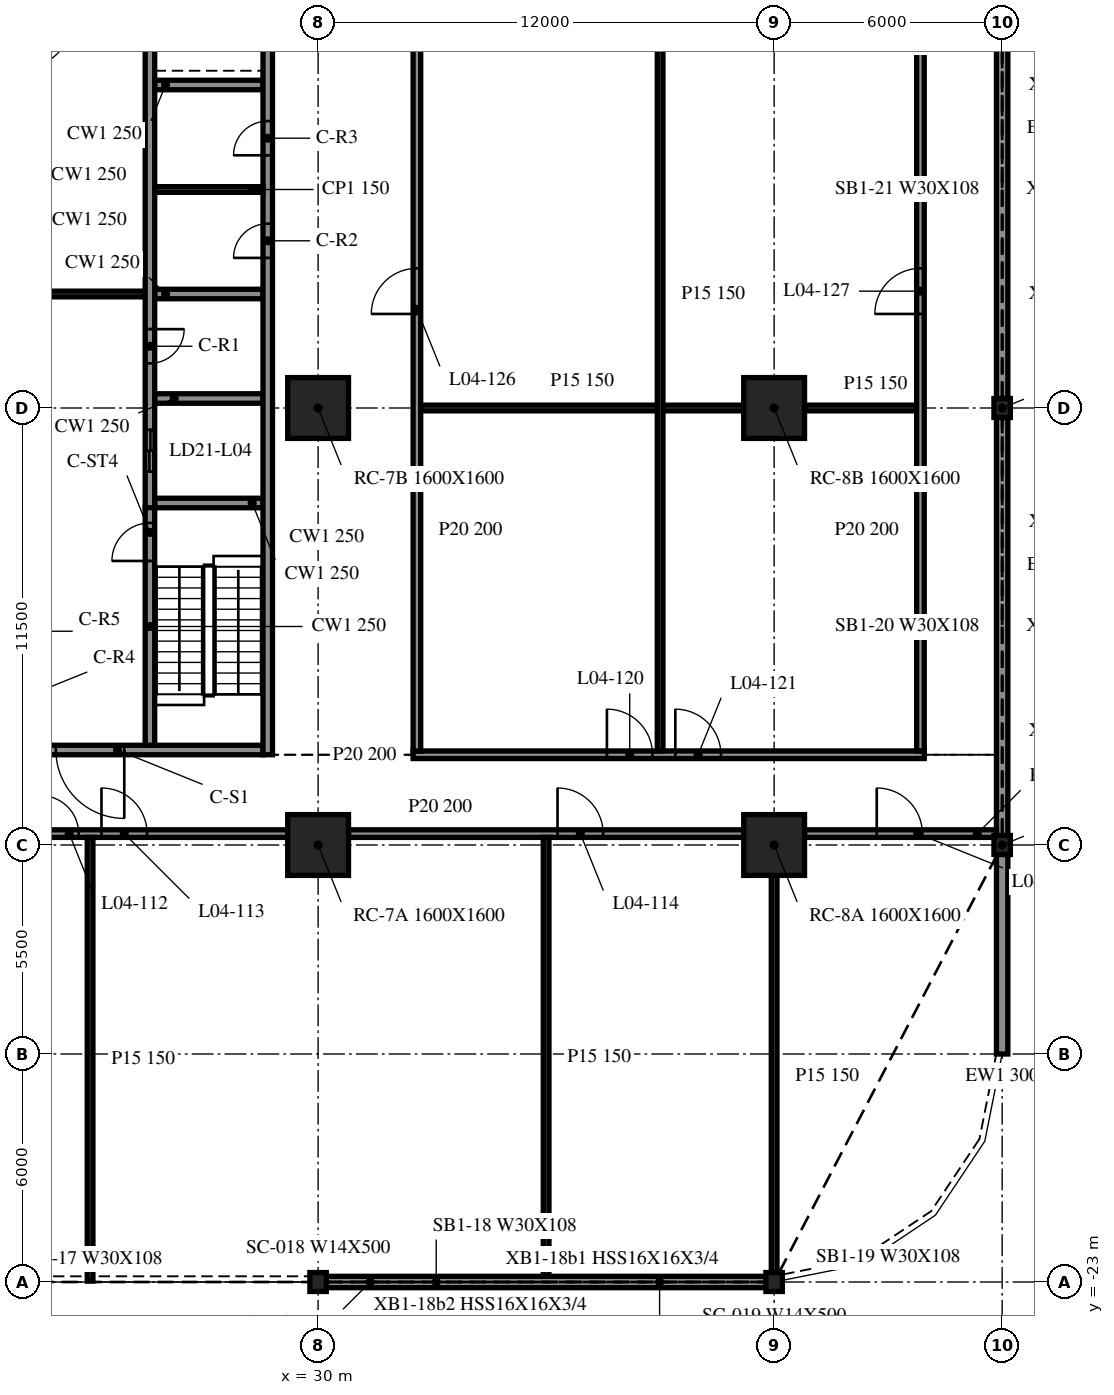
"""IFC4 building model, lengths in metres.
Left out: names, types, materials, properties, quantities, classifications, styles, units other than length and angle.
Written with IfcOpenShell. Run it as: python <this file> out.ifc"""

import sys

from ifc_helpers import new_model, si_unit, direction, frame, frame_2d, origin, origin_2d, place, context, subcontext, project, spatial, rectangle, i_section, extrude, element, fill, save


model = new_model("IFC4")
c1 = context("Model", 3, precision=1e-05, world=origin(), true_north=direction((0.0, 1.0)))
c2 = subcontext(c1, "Body", "Model", "MODEL_VIEW")
j1 = project(units=[si_unit("LENGTHUNIT", "METRE"), si_unit("PLANEANGLEUNIT", "RADIAN")], contexts=[c1])
p1 = place(None, origin())
s1 = spatial("IfcSite", under=j1, at=p1, CompositionType="ELEMENT")
p2 = place(p1, origin())
s2 = spatial("IfcBuilding", under=s1, at=p2, CompositionType="ELEMENT")
p3 = place(p2, frame((0.0, 0.0, 20.1)))
s3 = spatial("IfcBuildingStorey", under=s2, at=p3, CompositionType="ELEMENT", Elevation=20.1)
for number, where, z_axis, x_axis in (
    (1, (30.0, -11.5, -0.34), (0.0, 0.0, 1.0), (1.0, 0.0, 0.0)),
    (2, (30.0, 0.0, -0.34), (0.0, 0.0, 1.0), (1.0, 0.0, 0.0)),
    (3, (42.0, -11.5, -0.34), (0.0, 0.0, 1.0), (1.0, 0.0, 0.0)),
    (4, (42.0, 0.0, -0.34), (0.0, 0.0, 1.0), (1.0, 0.0, 0.0)),
):
    element("IfcColumn", number, at=place(p3, frame(where, z_axis=z_axis, x_axis=x_axis)), inside=s3, PredefinedType="COLUMN", context=c2, shape_type="SweptSolid", body=[
        extrude(rectangle(XDim=1.6, YDim=1.6, at=origin_2d()), origin(), (0.0, 0.0, 1.0), 4.3),
    ])
for number, where, z_axis, x_axis in (
    (5, (30.0, -23.0, -0.34), (0.0, 0.0, 1.0), (1.0, 0.0, 0.0)),
    (6, (42.0, -23.0, -0.34), (0.0, 0.0, 1.0), (1.0, 0.0, 0.0)),
    (7, (48.0, -11.5, -0.34), (0.0, 0.0, 1.0), (1.0, 0.0, 0.0)),
    (8, (48.0, 0.0, -0.34), (0.0, 0.0, 1.0), (1.0, 0.0, 0.0)),
):
    element("IfcColumn", number, at=place(p3, frame(where, z_axis=z_axis, x_axis=x_axis)), inside=s3, PredefinedType="COLUMN", context=c2, shape_type="SweptSolid", body=[
        extrude(i_section(OverallWidth=0.432, OverallDepth=0.498, WebThickness=0.056, FlangeThickness=0.089, at=origin_2d()), origin(), (0.0, 0.0, 1.0), 4.3),
    ])
p4 = place(p3, frame((30.028, -23.0, 0.0), z_axis=(0.0, 0.0, 1.0), x_axis=(1.0, 0.0, 0.0)))
e9 = element("IfcWall", 9, at=p4, inside=s3, PredefinedType="NOTDEFINED", context=c2, shape_type="SweptSolid", body=[
    extrude(rectangle(XDim=11.944, YDim=0.3, at=frame_2d((5.972, 0.0))), origin(), (0.0, 0.0, 1.0), 3.203),
])
p5 = place(p3, frame((48.0, -17.0, 0.0), z_axis=(0.0, 0.0, 1.0), x_axis=(0.0, 1.0, 0.0)))
e10 = element("IfcWall", 10, at=p5, inside=s3, PredefinedType="NOTDEFINED", context=c2, shape_type="SweptSolid", body=[
    extrude(rectangle(XDim=5.251, YDim=0.3, at=frame_2d((2.625, 0.0))), origin(), (0.0, 0.0, 1.0), 3.203),
])
for number, where, z_axis, x_axis in (
    (11, (48.0, -11.251, 0.0), (0.0, 0.0, 1.0), (0.0, 1.0, 0.0)),
    (12, (48.0, 0.249, 0.0), (0.0, 0.0, 1.0), (0.0, 1.0, 0.0)),
):
    element("IfcWall", number, at=place(p3, frame(where, z_axis=z_axis, x_axis=x_axis)), inside=s3, PredefinedType="NOTDEFINED", context=c2, shape_type="SweptSolid", body=[
        extrude(rectangle(XDim=11.002, YDim=0.3, at=frame_2d((5.501, 0.0))), origin(), (0.0, 0.0, 1.0), 3.203),
    ])
p6 = place(p3, frame((28.675, -9.125, 0.0), z_axis=(0.0, 0.0, 1.0), x_axis=(0.0, 1.0, 0.0)))
e13 = element("IfcWall", 13, at=p6, inside=s3, PredefinedType="SOLIDWALL", context=c2, shape_type="SweptSolid", body=[
    extrude(rectangle(XDim=24.25, YDim=0.25, at=frame_2d((12.125, 0.0))), origin(), (0.0, 0.0, 1.0), 3.96),
])
p7 = place(p6, frame((13.075, 0.0, 0.0)))
e14 = element("IfcOpeningElement", 14, at=p7, cuts=e13, PredefinedType="OPENING", context=c2, shape_type="SweptSolid", body=[
    extrude(rectangle(XDim=0.9, YDim=2.1, at=frame_2d((0.45, 1.05))), frame((0.0, 0.135, 0.0), z_axis=(0.0, -1.0, 0.0), x_axis=(1.0, 0.0, 0.0)), (0.0, 0.0, 1.0), 0.27),
])
p8 = place(p6, frame((15.775, 0.0, 0.0)))
e15 = element("IfcOpeningElement", 15, at=p8, cuts=e13, PredefinedType="OPENING", context=c2, shape_type="SweptSolid", body=[
    extrude(rectangle(XDim=0.9, YDim=2.1, at=frame_2d((0.45, 1.05))), frame((0.0, 0.135, 0.0), z_axis=(0.0, -1.0, 0.0), x_axis=(1.0, 0.0, 0.0)), (0.0, 0.0, 1.0), 0.27),
])
p9 = place(p6, frame((18.925, 0.0, 0.0)))
e16 = element("IfcOpeningElement", 16, at=p9, cuts=e13, PredefinedType="OPENING", context=c2, shape_type="SweptSolid", body=[
    extrude(rectangle(XDim=0.9, YDim=2.1, at=frame_2d((0.45, 1.05))), frame((0.0, 0.135, 0.0), z_axis=(0.0, -1.0, 0.0), x_axis=(1.0, 0.0, 0.0)), (0.0, 0.0, 1.0), 0.27),
])
p10 = place(p6, frame((22.327, 0.0, 0.0)))
e17 = element("IfcOpeningElement", 17, at=p10, cuts=e13, PredefinedType="OPENING", context=c2, shape_type="SweptSolid", body=[
    extrude(rectangle(XDim=0.9, YDim=2.1, at=frame_2d((0.45, 1.05))), frame((0.0, 0.135, 0.0), z_axis=(0.0, -1.0, 0.0), x_axis=(1.0, 0.0, 0.0)), (0.0, 0.0, 1.0), 0.27),
])
p11 = place(p3, frame((28.55, -9.0, 0.0), z_axis=(0.0, 0.0, 1.0), x_axis=(-1.0, 0.0, 0.0)))
e18 = element("IfcWall", 18, at=p11, inside=s3, PredefinedType="SOLIDWALL", context=c2, shape_type="SweptSolid", body=[
    extrude(rectangle(XDim=9.1, YDim=0.25, at=frame_2d((4.55, 0.0))), origin(), (0.0, 0.0, 1.0), 3.96),
])
p12 = place(p11, frame((3.65, 0.0, 0.0)))
e19 = element("IfcOpeningElement", 19, at=p12, cuts=e18, PredefinedType="OPENING", context=c2, shape_type="SweptSolid", body=[
    extrude(rectangle(XDim=1.8, YDim=2.1, at=frame_2d((0.9, 1.05))), frame((0.0, 0.135, 0.0), z_axis=(0.0, -1.0, 0.0), x_axis=(1.0, 0.0, 0.0)), (0.0, 0.0, 1.0), 0.27),
])
p13 = place(p3, frame((25.575, -8.875, 0.0), z_axis=(0.0, 0.0, 1.0), x_axis=(0.0, 1.0, 0.0)))
e20 = element("IfcWall", 20, at=p13, inside=s3, PredefinedType="SOLIDWALL", context=c2, shape_type="SweptSolid", body=[
    extrude(rectangle(XDim=6.25, YDim=0.25, at=frame_2d((3.125, 0.0))), origin(), (0.0, 0.0, 1.0), 3.96),
])
p14 = place(p13, frame((4.85, 0.0, 0.0)))
e21 = element("IfcOpeningElement", 21, at=p14, cuts=e20, PredefinedType="OPENING", context=c2, shape_type="SweptSolid", body=[
    extrude(rectangle(XDim=1.0, YDim=2.1, at=frame_2d((0.5, 1.05))), frame((0.0, 0.135, 0.0), z_axis=(0.0, -1.0, 0.0), x_axis=(1.0, 0.0, 0.0)), (0.0, 0.0, 1.0), 0.27),
])
p15 = place(p3, frame((25.575, 14.875, 0.0), z_axis=(0.0, 0.0, 1.0), x_axis=(0.0, -1.0, 0.0)))
e22 = element("IfcWall", 22, at=p15, inside=s3, PredefinedType="SOLIDWALL", context=c2, shape_type="SweptSolid", body=[
    extrude(rectangle(XDim=17.5, YDim=0.25, at=frame_2d((8.75, 0.0))), origin(), (0.0, 0.0, 1.0), 3.96),
])
p16 = place(p15, frame((15.45, 0.0, 0.0)))
e23 = element("IfcOpeningElement", 23, at=p16, cuts=e22, PredefinedType="OPENING", context=c2, shape_type="SweptSolid", body=[
    extrude(rectangle(XDim=1.1, YDim=2.1, at=frame_2d((0.55, 1.05))), frame((0.0, 0.135, 0.0), z_axis=(0.0, -1.0, 0.0), x_axis=(1.0, 0.0, 0.0)), (0.0, 0.0, 1.0), 0.27),
])
p17 = place(p15, frame((12.8, 0.0, 0.0)))
e24 = element("IfcOpeningElement", 24, at=p17, cuts=e22, PredefinedType="OPENING", context=c2, shape_type="SweptSolid", body=[
    extrude(rectangle(XDim=0.9, YDim=2.1, at=frame_2d((0.45, 1.05))), frame((0.0, 0.135, 0.0), z_axis=(0.0, -1.0, 0.0), x_axis=(1.0, 0.0, 0.0)), (0.0, 0.0, 1.0), 0.27),
])
for number, where, z_axis, x_axis in (
    (25, (25.7, -2.5, 0.0), (0.0, 0.0, 1.0), (1.0, 0.0, 0.0)),
    (26, (25.7, 0.25, 0.0), (0.0, 0.0, 1.0), (1.0, 0.0, 0.0)),
    (27, (25.7, 3.0, 0.0), (0.0, 0.0, 1.0), (1.0, 0.0, 0.0)),
    (28, (25.7, 8.5, 0.0), (0.0, 0.0, 1.0), (1.0, 0.0, 0.0)),
):
    element("IfcWall", number, at=place(p3, frame(where, z_axis=z_axis, x_axis=x_axis)), inside=s3, PredefinedType="SOLIDWALL", context=c2, shape_type="SweptSolid", body=[
        extrude(rectangle(XDim=2.85, YDim=0.25, at=frame_2d((1.425, 0.0))), origin(), (0.0, 0.0, 1.0), 3.96),
    ])
p18 = place(p3, frame((22.55, 3.0, 0.0), z_axis=(0.0, 0.0, 1.0), x_axis=(1.0, 0.0, 0.0)))
e29 = element("IfcWall", 29, at=p18, inside=s3, PredefinedType="PARTITIONING", context=c2, shape_type="SweptSolid", body=[
    extrude(rectangle(XDim=2.9, YDim=0.15, at=frame_2d((1.45, 0.0))), origin(), (0.0, 0.0, 1.0), 3.96),
])
p19 = place(p3, frame((25.7, 5.75, 0.0), z_axis=(0.0, 0.0, 1.0), x_axis=(1.0, 0.0, 0.0)))
e30 = element("IfcWall", 30, at=p19, inside=s3, PredefinedType="PARTITIONING", context=c2, shape_type="SweptSolid", body=[
    extrude(rectangle(XDim=2.85, YDim=0.15, at=frame_2d((1.425, 0.0))), origin(), (0.0, 0.0, 1.0), 3.96),
])
p20 = place(p3, frame((18.8, -11.2, 0.0), z_axis=(0.0, 0.0, 1.0), x_axis=(1.0, 0.0, 0.0)))
e31 = element("IfcWall", 31, at=p20, inside=s3, PredefinedType="PARTITIONING", context=c2, shape_type="SweptSolid", body=[
    extrude(rectangle(XDim=10.4, YDim=0.2, at=frame_2d((5.2, 0.0))), origin(), (0.0, 0.0, 1.0), 3.96),
])
p21 = place(p20, frame((3.9, 0.0, 0.0)))
e32 = element("IfcOpeningElement", 32, at=p21, cuts=e31, PredefinedType="OPENING", context=c2, shape_type="SweptSolid", body=[
    extrude(rectangle(XDim=1.0, YDim=2.1, at=frame_2d((0.5, 1.05))), frame((0.0, 0.11, 0.0), z_axis=(0.0, -1.0, 0.0), x_axis=(1.0, 0.0, 0.0)), (0.0, 0.0, 1.0), 0.22),
])
p22 = place(p20, frame((5.5, 0.0, 0.0)))
e33 = element("IfcOpeningElement", 33, at=p22, cuts=e31, PredefinedType="OPENING", context=c2, shape_type="SweptSolid", body=[
    extrude(rectangle(XDim=1.2, YDim=2.1, at=frame_2d((0.6, 1.05))), frame((0.0, 0.11, 0.0), z_axis=(0.0, -1.0, 0.0), x_axis=(1.0, 0.0, 0.0)), (0.0, 0.0, 1.0), 0.22),
])
p23 = place(p3, frame((30.8, -11.2, 0.0), z_axis=(0.0, 0.0, 1.0), x_axis=(1.0, 0.0, 0.0)))
e34 = element("IfcWall", 34, at=p23, inside=s3, PredefinedType="PARTITIONING", context=c2, shape_type="SweptSolid", body=[
    extrude(rectangle(XDim=10.4, YDim=0.2, at=frame_2d((5.2, 0.0))), origin(), (0.0, 0.0, 1.0), 3.96),
])
p24 = place(p23, frame((5.5, 0.0, 0.0)))
e35 = element("IfcOpeningElement", 35, at=p24, cuts=e34, PredefinedType="OPENING", context=c2, shape_type="SweptSolid", body=[
    extrude(rectangle(XDim=1.2, YDim=2.1, at=frame_2d((0.6, 1.05))), frame((0.0, 0.11, 0.0), z_axis=(0.0, -1.0, 0.0), x_axis=(1.0, 0.0, 0.0)), (0.0, 0.0, 1.0), 0.22),
])
p25 = place(p3, frame((42.8, -11.2, 0.0), z_axis=(0.0, 0.0, 1.0), x_axis=(1.0, 0.0, 0.0)))
e36 = element("IfcWall", 36, at=p25, inside=s3, PredefinedType="PARTITIONING", context=c2, shape_type="SweptSolid", body=[
    extrude(rectangle(XDim=5.05, YDim=0.2, at=frame_2d((2.525, 0.0))), origin(), (0.0, 0.0, 1.0), 3.96),
])
p26 = place(p25, frame((1.9, 0.0, 0.0)))
e37 = element("IfcOpeningElement", 37, at=p26, cuts=e36, PredefinedType="OPENING", context=c2, shape_type="SweptSolid", body=[
    extrude(rectangle(XDim=1.2, YDim=2.1, at=frame_2d((0.6, 1.05))), frame((0.0, 0.11, 0.0), z_axis=(0.0, -1.0, 0.0), x_axis=(1.0, 0.0, 0.0)), (0.0, 0.0, 1.0), 0.22),
])
p27 = place(p3, frame((32.5, -9.125, 0.0), z_axis=(0.0, 0.0, 1.0), x_axis=(1.0, 0.0, 0.0)))
e38 = element("IfcWall", 38, at=p27, inside=s3, PredefinedType="PARTITIONING", context=c2, shape_type="SweptSolid", body=[
    extrude(rectangle(XDim=13.45, YDim=0.2, at=frame_2d((6.725, 0.0))), origin(), (0.0, 0.0, 1.0), 3.96),
])
p28 = place(p27, frame((5.1, 0.0, 0.0)))
e39 = element("IfcOpeningElement", 39, at=p28, cuts=e38, PredefinedType="OPENING", context=c2, shape_type="SweptSolid", body=[
    extrude(rectangle(XDim=1.2, YDim=2.1, at=frame_2d((0.6, 1.05))), frame((0.0, 0.11, 0.0), z_axis=(0.0, -1.0, 0.0), x_axis=(1.0, 0.0, 0.0)), (0.0, 0.0, 1.0), 0.22),
])
p29 = place(p27, frame((6.9, 0.0, 0.0)))
e40 = element("IfcOpeningElement", 40, at=p29, cuts=e38, PredefinedType="OPENING", context=c2, shape_type="SweptSolid", body=[
    extrude(rectangle(XDim=1.2, YDim=2.1, at=frame_2d((0.6, 1.05))), frame((0.0, 0.11, 0.0), z_axis=(0.0, -1.0, 0.0), x_axis=(1.0, 0.0, 0.0)), (0.0, 0.0, 1.0), 0.22),
])
p30 = place(p3, frame((32.7, 0.0, 0.0), z_axis=(0.0, 0.0, 1.0), x_axis=(1.0, 0.0, 0.0)))
e41 = element("IfcWall", 41, at=p30, inside=s3, PredefinedType="PARTITIONING", context=c2, shape_type="SweptSolid", body=[
    extrude(rectangle(XDim=8.5, YDim=0.15, at=frame_2d((4.25, 0.0))), origin(), (0.0, 0.0, 1.0), 3.96),
])
p31 = place(p3, frame((42.8, 0.0, 0.0), z_axis=(0.0, 0.0, 1.0), x_axis=(1.0, 0.0, 0.0)))
e42 = element("IfcWall", 42, at=p31, inside=s3, PredefinedType="PARTITIONING", context=c2, shape_type="SweptSolid", body=[
    extrude(rectangle(XDim=2.95, YDim=0.15, at=frame_2d((1.475, 0.0))), origin(), (0.0, 0.0, 1.0), 3.96),
])
p32 = place(p3, frame((24.0, -22.975, 0.0), z_axis=(0.0, 0.0, 1.0), x_axis=(0.0, 1.0, 0.0)))
e43 = element("IfcWall", 43, at=p32, inside=s3, PredefinedType="PARTITIONING", context=c2, shape_type="SweptSolid", body=[
    extrude(rectangle(XDim=11.675, YDim=0.15, at=frame_2d((5.837, 0.0))), origin(), (0.0, 0.0, 1.0), 3.96),
])
p33 = place(p3, frame((32.6, -9.025, 0.0), z_axis=(0.0, 0.0, 1.0), x_axis=(0.0, 1.0, 0.0)))
e44 = element("IfcWall", 44, at=p33, inside=s3, PredefinedType="PARTITIONING", context=c2, shape_type="SweptSolid", body=[
    extrude(rectangle(XDim=24.05, YDim=0.2, at=frame_2d((12.025, 0.0))), origin(), (0.0, 0.0, 1.0), 3.96),
])
p34 = place(p33, frame((11.5, 0.0, 0.0)))
e45 = element("IfcOpeningElement", 45, at=p34, cuts=e44, PredefinedType="OPENING", context=c2, shape_type="SweptSolid", body=[
    extrude(rectangle(XDim=1.2, YDim=2.1, at=frame_2d((0.6, 1.05))), frame((0.0, 0.11, 0.0), z_axis=(0.0, -1.0, 0.0), x_axis=(1.0, 0.0, 0.0)), (0.0, 0.0, 1.0), 0.22),
])
p35 = place(p3, frame((36.0, -22.85, 0.0), z_axis=(0.0, 0.0, 1.0), x_axis=(0.0, 1.0, 0.0)))
e46 = element("IfcWall", 46, at=p35, inside=s3, PredefinedType="PARTITIONING", context=c2, shape_type="SweptSolid", body=[
    extrude(rectangle(XDim=11.55, YDim=0.15, at=frame_2d((5.775, 0.0))), origin(), (0.0, 0.0, 1.0), 3.96),
])
p36 = place(p3, frame((39.0, -9.025, 0.0), z_axis=(0.0, 0.0, 1.0), x_axis=(0.0, 1.0, 0.0)))
e47 = element("IfcWall", 47, at=p36, inside=s3, PredefinedType="PARTITIONING", context=c2, shape_type="SweptSolid", body=[
    extrude(rectangle(XDim=24.05, YDim=0.15, at=frame_2d((12.025, 0.0))), origin(), (0.0, 0.0, 1.0), 3.96),
])
p37 = place(p3, frame((42.0, -22.847, 0.0), z_axis=(0.0, 0.0, 1.0), x_axis=(0.0, 1.0, 0.0)))
e48 = element("IfcWall", 48, at=p37, inside=s3, PredefinedType="PARTITIONING", context=c2, shape_type="SweptSolid", body=[
    extrude(rectangle(XDim=10.547, YDim=0.15, at=frame_2d((5.273, 0.0))), origin(), (0.0, 0.0, 1.0), 3.96),
])
p38 = place(p3, frame((45.85, -9.025, 0.0), z_axis=(0.0, 0.0, 1.0), x_axis=(0.0, 1.0, 0.0)))
e49 = element("IfcWall", 49, at=p38, inside=s3, PredefinedType="PARTITIONING", context=c2, shape_type="SweptSolid", body=[
    extrude(rectangle(XDim=24.05, YDim=0.2, at=frame_2d((12.025, 0.0))), origin(), (0.0, 0.0, 1.0), 3.96),
])
p39 = place(p38, frame((11.5, 0.0, 0.0)))
e50 = element("IfcOpeningElement", 50, at=p39, cuts=e49, PredefinedType="OPENING", context=c2, shape_type="SweptSolid", body=[
    extrude(rectangle(XDim=1.2, YDim=2.1, at=frame_2d((0.6, 1.05))), frame((0.0, 0.11, 0.0), z_axis=(0.0, -1.0, 0.0), x_axis=(1.0, 0.0, 0.0)), (0.0, 0.0, 1.0), 0.22),
])
p40 = place(p12, origin())
e51 = element("IfcDoor", 51, at=p40, inside=s3, OperationType="DOUBLE_DOOR_SINGLE_SWING", PredefinedType="DOOR", context=c2, shape_type="SweptSolid", body=[
    extrude(rectangle(XDim=1.8, YDim=2.1, at=frame_2d((0.9, 1.05))), frame((0.0, 0.025, 0.0), z_axis=(0.0, -1.0, 0.0), x_axis=(1.0, 0.0, 0.0)), (0.0, 0.0, 1.0), 0.05),
])
fill(e19, e51)
p41 = place(p16, origin())
e52 = element("IfcDoor", 52, at=p41, inside=s3, OperationType="DOUBLE_DOOR_SLIDING", PredefinedType="DOOR", context=c2, shape_type="SweptSolid", body=[
    extrude(rectangle(XDim=1.1, YDim=2.1, at=frame_2d((0.55, 1.05))), frame((0.0, 0.025, 0.0), z_axis=(0.0, -1.0, 0.0), x_axis=(1.0, 0.0, 0.0)), (0.0, 0.0, 1.0), 0.05),
])
fill(e23, e52)
p42 = place(p17, origin())
e53 = element("IfcDoor", 53, at=p42, inside=s3, OperationType="SINGLE_SWING_LEFT", PredefinedType="DOOR", context=c2, shape_type="SweptSolid", body=[
    extrude(rectangle(XDim=0.9, YDim=2.1, at=frame_2d((0.45, 1.05))), frame((0.0, 0.025, 0.0), z_axis=(0.0, -1.0, 0.0), x_axis=(1.0, 0.0, 0.0)), (0.0, 0.0, 1.0), 0.05),
])
fill(e24, e53)
p43 = place(p7, origin())
e54 = element("IfcDoor", 54, at=p43, inside=s3, OperationType="SINGLE_SWING_RIGHT", PredefinedType="DOOR", context=c2, shape_type="SweptSolid", body=[
    extrude(rectangle(XDim=0.9, YDim=2.1, at=frame_2d((0.45, 1.05))), frame((0.0, 0.025, 0.0), z_axis=(0.0, -1.0, 0.0), x_axis=(1.0, 0.0, 0.0)), (0.0, 0.0, 1.0), 0.05),
])
fill(e14, e54)
p44 = place(p8, origin())
e55 = element("IfcDoor", 55, at=p44, inside=s3, OperationType="SINGLE_SWING_LEFT", PredefinedType="DOOR", context=c2, shape_type="SweptSolid", body=[
    extrude(rectangle(XDim=0.9, YDim=2.1, at=frame_2d((0.45, 1.05))), frame((0.0, 0.025, 0.0), z_axis=(0.0, -1.0, 0.0), x_axis=(1.0, 0.0, 0.0)), (0.0, 0.0, 1.0), 0.05),
])
fill(e15, e55)
p45 = place(p14, origin())
e56 = element("IfcDoor", 56, at=p45, inside=s3, OperationType="SINGLE_SWING_RIGHT", PredefinedType="DOOR", context=c2, shape_type="SweptSolid", body=[
    extrude(rectangle(XDim=1.0, YDim=2.1, at=frame_2d((0.5, 1.05))), frame((0.0, 0.025, 0.0), z_axis=(0.0, -1.0, 0.0), x_axis=(1.0, 0.0, 0.0)), (0.0, 0.0, 1.0), 0.05),
])
fill(e21, e56)
p46 = place(p21, origin())
e57 = element("IfcDoor", 57, at=p46, inside=s3, OperationType="SINGLE_SWING_RIGHT", PredefinedType="DOOR", context=c2, shape_type="SweptSolid", body=[
    extrude(rectangle(XDim=1.0, YDim=2.1, at=frame_2d((0.5, 1.05))), frame((0.0, 0.025, 0.0), z_axis=(0.0, -1.0, 0.0), x_axis=(1.0, 0.0, 0.0)), (0.0, 0.0, 1.0), 0.05),
])
fill(e32, e57)
p47 = place(p22, origin())
e58 = element("IfcDoor", 58, at=p47, inside=s3, OperationType="SINGLE_SWING_LEFT", PredefinedType="DOOR", context=c2, shape_type="SweptSolid", body=[
    extrude(rectangle(XDim=1.2, YDim=2.1, at=frame_2d((0.6, 1.05))), frame((0.0, 0.025, 0.0), z_axis=(0.0, -1.0, 0.0), x_axis=(1.0, 0.0, 0.0)), (0.0, 0.0, 1.0), 0.05),
])
fill(e33, e58)
p48 = place(p24, origin())
e59 = element("IfcDoor", 59, at=p48, inside=s3, OperationType="SINGLE_SWING_LEFT", PredefinedType="DOOR", context=c2, shape_type="SweptSolid", body=[
    extrude(rectangle(XDim=1.2, YDim=2.1, at=frame_2d((0.6, 1.05))), frame((0.0, 0.025, 0.0), z_axis=(0.0, -1.0, 0.0), x_axis=(1.0, 0.0, 0.0)), (0.0, 0.0, 1.0), 0.05),
])
fill(e35, e59)
p49 = place(p26, origin())
e60 = element("IfcDoor", 60, at=p49, inside=s3, OperationType="SINGLE_SWING_RIGHT", PredefinedType="DOOR", context=c2, shape_type="SweptSolid", body=[
    extrude(rectangle(XDim=1.2, YDim=2.1, at=frame_2d((0.6, 1.05))), frame((0.0, 0.025, 0.0), z_axis=(0.0, -1.0, 0.0), x_axis=(1.0, 0.0, 0.0)), (0.0, 0.0, 1.0), 0.05),
])
fill(e37, e60)
p50 = place(p28, origin())
e61 = element("IfcDoor", 61, at=p50, inside=s3, OperationType="SINGLE_SWING_LEFT", PredefinedType="DOOR", context=c2, shape_type="SweptSolid", body=[
    extrude(rectangle(XDim=1.2, YDim=2.1, at=frame_2d((0.6, 1.05))), frame((0.0, 0.025, 0.0), z_axis=(0.0, -1.0, 0.0), x_axis=(1.0, 0.0, 0.0)), (0.0, 0.0, 1.0), 0.05),
])
fill(e39, e61)
p51 = place(p29, origin())
e62 = element("IfcDoor", 62, at=p51, inside=s3, OperationType="SINGLE_SWING_RIGHT", PredefinedType="DOOR", context=c2, shape_type="SweptSolid", body=[
    extrude(rectangle(XDim=1.2, YDim=2.1, at=frame_2d((0.6, 1.05))), frame((0.0, 0.025, 0.0), z_axis=(0.0, -1.0, 0.0), x_axis=(1.0, 0.0, 0.0)), (0.0, 0.0, 1.0), 0.05),
])
fill(e40, e62)
p52 = place(p34, origin())
e63 = element("IfcDoor", 63, at=p52, inside=s3, OperationType="SINGLE_SWING_LEFT", PredefinedType="DOOR", context=c2, shape_type="SweptSolid", body=[
    extrude(rectangle(XDim=1.2, YDim=2.1, at=frame_2d((0.6, 1.05))), frame((0.0, 0.025, 0.0), z_axis=(0.0, -1.0, 0.0), x_axis=(1.0, 0.0, 0.0)), (0.0, 0.0, 1.0), 0.05),
])
fill(e45, e63)
p53 = place(p39, origin())
e64 = element("IfcDoor", 64, at=p53, inside=s3, OperationType="SINGLE_SWING_RIGHT", PredefinedType="DOOR", context=c2, shape_type="SweptSolid", body=[
    extrude(rectangle(XDim=1.2, YDim=2.1, at=frame_2d((0.6, 1.05))), frame((0.0, 0.025, 0.0), z_axis=(0.0, -1.0, 0.0), x_axis=(1.0, 0.0, 0.0)), (0.0, 0.0, 1.0), 0.05),
])
fill(e50, e64)
save(model, sys.argv[1])
